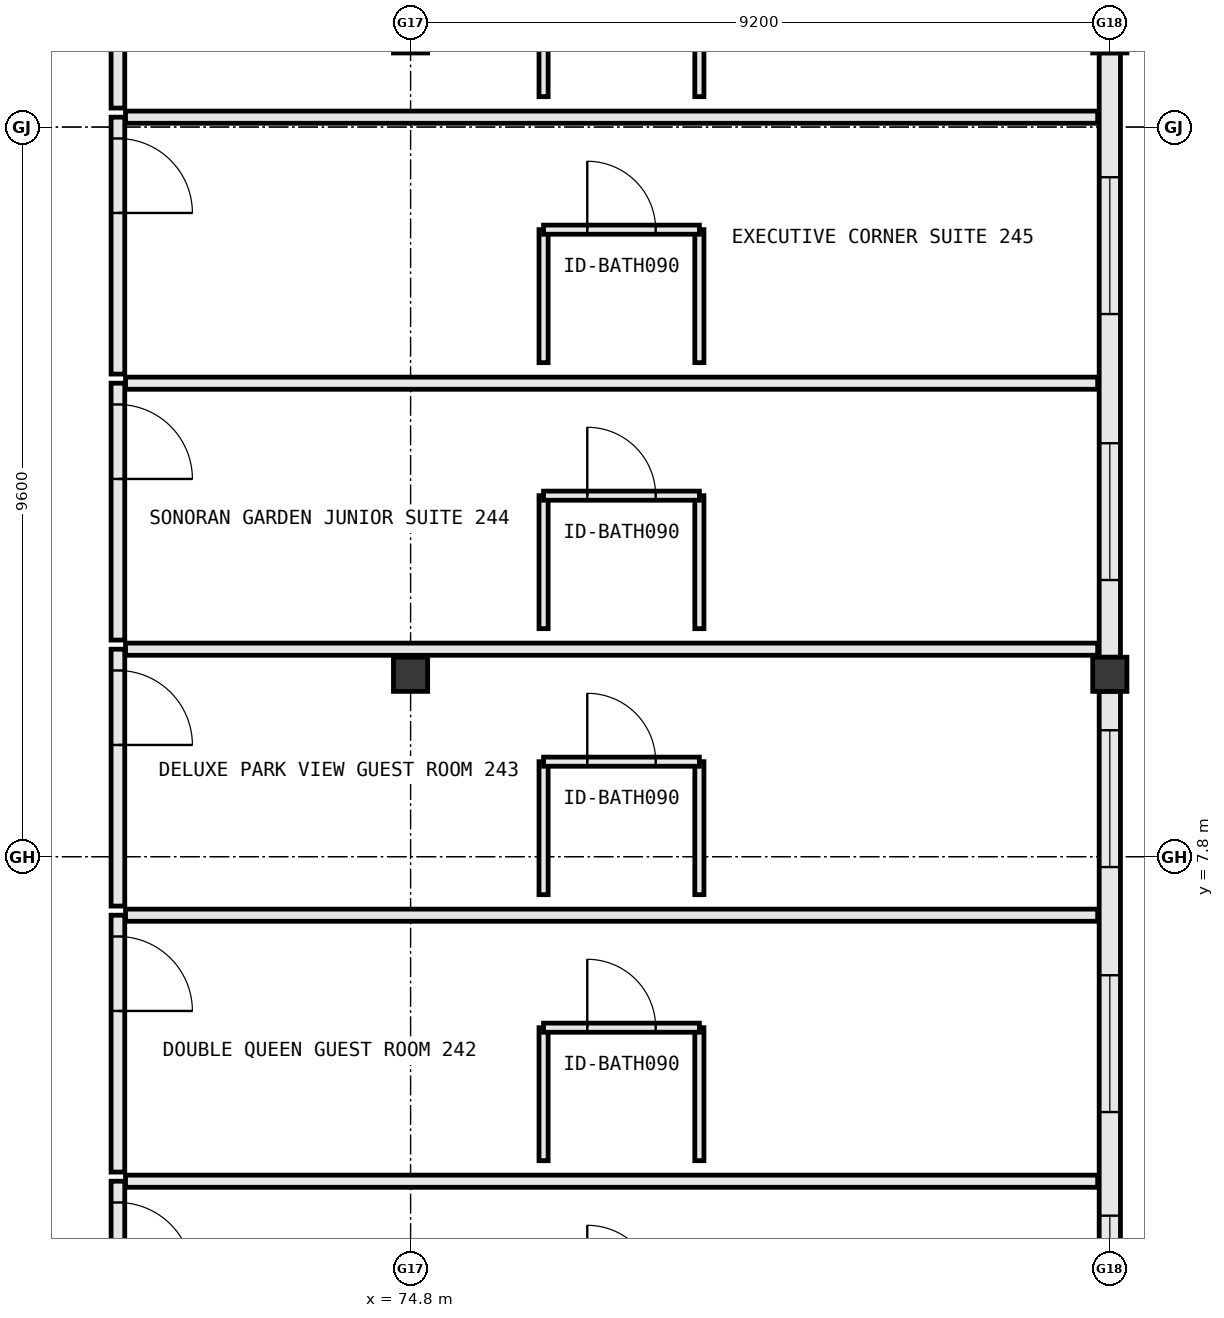
"""IFC4 building model, lengths in metres.
Left out: names, types, materials, properties, quantities, classifications, styles, units other than length and angle.
Written with IfcOpenShell. Run it as: python <this file> out.ifc"""

import sys

from ifc_helpers import new_model, si_unit, direction, frame, frame_2d, origin, origin_2d, place, context, subcontext, project, spatial, rectangle, extrude, element, fill, save


model = new_model("IFC4")
c1 = context("Model", 3, precision=1e-05, world=origin(), true_north=direction((0.0, 1.0)))
c2 = subcontext(c1, "Body", "Model", "MODEL_VIEW")
j1 = project(units=[si_unit("LENGTHUNIT", "METRE"), si_unit("PLANEANGLEUNIT", "RADIAN")], contexts=[c1])
p1 = place(None, origin())
s1 = spatial("IfcSite", under=j1, at=p1, CompositionType="ELEMENT")
p2 = place(p1, origin())
s2 = spatial("IfcBuilding", under=s1, at=p2, CompositionType="ELEMENT")
p3 = place(p2, frame((0.0, 0.0, 35.2)))
s3 = spatial("IfcBuildingStorey", under=s2, at=p3, CompositionType="ELEMENT", Elevation=35.2)
for number, where, z_axis, x_axis in (
    (1, (74.8, 10.2, 0.0), (0.0, 0.0, 1.0), (1.0, 0.0, 0.0)),
    (2, (74.8, 18.6, 0.0), (0.0, 0.0, 1.0), (1.0, 0.0, 0.0)),
    (3, (84.0, 10.2, 0.0), (0.0, 0.0, 1.0), (1.0, 0.0, 0.0)),
    (4, (84.0, 18.6, 0.0), (0.0, 0.0, 1.0), (1.0, 0.0, 0.0)),
):
    element("IfcColumn", number, at=place(p3, frame(where, z_axis=z_axis, x_axis=x_axis)), inside=s3, PredefinedType="COLUMN", context=c2, shape_type="SweptSolid", body=[
        extrude(rectangle(XDim=0.45, YDim=0.45, at=origin_2d()), origin(), (0.0, 0.0, 1.0), 3.8),
    ])
p4 = place(p3, frame((84.0, 0.823, 0.0), z_axis=(0.0, 0.0, 1.0), x_axis=(0.0, 1.0, 0.0)))
e5 = element("IfcWall", 5, at=p4, inside=s3, PredefinedType="STANDARD", context=c2, shape_type="SweptSolid", body=[
    extrude(rectangle(XDim=9.154, YDim=0.28, at=frame_2d((4.577, 0.0))), origin(), (0.0, 0.0, 1.0), 2.98),
])
p5 = place(p4, frame((0.454, 0.0, 0.85)))
e6 = element("IfcOpeningElement", 6, at=p5, cuts=e5, PredefinedType="OPENING", context=c2, shape_type="SweptSolid", body=[
    extrude(rectangle(XDim=1.8, YDim=1.85, at=frame_2d((0.9, 0.925))), frame((0.0, 0.152, 0.0), z_axis=(0.0, -1.0, 0.0), x_axis=(1.0, 0.0, 0.0)), (0.0, 0.0, 1.0), 0.304),
])
p6 = place(p4, frame((3.617, 0.0, 0.85)))
e7 = element("IfcOpeningElement", 7, at=p6, cuts=e5, PredefinedType="OPENING", context=c2, shape_type="SweptSolid", body=[
    extrude(rectangle(XDim=1.8, YDim=1.85, at=frame_2d((0.9, 0.925))), frame((0.0, 0.152, 0.0), z_axis=(0.0, -1.0, 0.0), x_axis=(1.0, 0.0, 0.0)), (0.0, 0.0, 1.0), 0.304),
])
p7 = place(p4, frame((6.841, 0.0, 0.85)))
e8 = element("IfcOpeningElement", 8, at=p7, cuts=e5, PredefinedType="OPENING", context=c2, shape_type="SweptSolid", body=[
    extrude(rectangle(XDim=1.8, YDim=1.85, at=frame_2d((0.9, 0.925))), frame((0.0, 0.152, 0.0), z_axis=(0.0, -1.0, 0.0), x_axis=(1.0, 0.0, 0.0)), (0.0, 0.0, 1.0), 0.304),
])
p8 = place(p3, frame((84.0, 10.423, 0.0), z_axis=(0.0, 0.0, 1.0), x_axis=(0.0, 1.0, 0.0)))
e9 = element("IfcWall", 9, at=p8, inside=s3, PredefinedType="STANDARD", context=c2, shape_type="SweptSolid", body=[
    extrude(rectangle(XDim=7.954, YDim=0.28, at=frame_2d((3.977, 0.0))), origin(), (0.0, 0.0, 1.0), 2.98),
])
p9 = place(p8, frame((1.017, 0.0, 0.85)))
e10 = element("IfcOpeningElement", 10, at=p9, cuts=e9, PredefinedType="OPENING", context=c2, shape_type="SweptSolid", body=[
    extrude(rectangle(XDim=1.8, YDim=1.85, at=frame_2d((0.9, 0.925))), frame((0.0, 0.152, 0.0), z_axis=(0.0, -1.0, 0.0), x_axis=(1.0, 0.0, 0.0)), (0.0, 0.0, 1.0), 0.304),
])
p10 = place(p8, frame((4.517, 0.0, 0.85)))
e11 = element("IfcOpeningElement", 11, at=p10, cuts=e9, PredefinedType="OPENING", context=c2, shape_type="SweptSolid", body=[
    extrude(rectangle(XDim=1.8, YDim=1.85, at=frame_2d((0.9, 0.925))), frame((0.0, 0.152, 0.0), z_axis=(0.0, -1.0, 0.0), x_axis=(1.0, 0.0, 0.0)), (0.0, 0.0, 1.0), 0.304),
])
p11 = place(p3, frame((70.95, 3.53, 0.0), z_axis=(0.0, 0.0, 1.0), x_axis=(0.0, -1.0, 0.0)))
e12 = element("IfcWall", 12, at=p11, inside=s3, PredefinedType="PARTITIONING", context=c2, shape_type="SweptSolid", body=[
    extrude(rectangle(XDim=3.38, YDim=0.18, at=frame_2d((1.69, 0.0))), origin(), (0.0, 0.0, 1.0), 3.565),
])
p12 = place(p11, frame((0.28, 0.0, 0.0)))
e13 = element("IfcOpeningElement", 13, at=p12, cuts=e12, PredefinedType="OPENING", context=c2, shape_type="SweptSolid", body=[
    extrude(rectangle(XDim=0.98, YDim=2.18, at=frame_2d((0.49, 1.09))), frame((0.0, 0.102, 0.0), z_axis=(0.0, -1.0, 0.0), x_axis=(1.0, 0.0, 0.0)), (0.0, 0.0, 1.0), 0.204),
])
p13 = place(p3, frame((71.05, 3.53, 0.0), z_axis=(0.0, 0.0, 1.0), x_axis=(1.0, 0.0, 0.0)))
e14 = element("IfcWall", 14, at=p13, inside=s3, PredefinedType="PARTITIONING", context=c2, shape_type="SweptSolid", body=[
    extrude(rectangle(XDim=12.79, YDim=0.16, at=frame_2d((6.395, 0.0))), origin(), (0.0, 0.0, 1.0), 3.565),
])
p14 = place(p3, frame((70.95, 7.03, 0.0), z_axis=(0.0, 0.0, 1.0), x_axis=(0.0, -1.0, 0.0)))
e15 = element("IfcWall", 15, at=p14, inside=s3, PredefinedType="PARTITIONING", context=c2, shape_type="SweptSolid", body=[
    extrude(rectangle(XDim=3.38, YDim=0.18, at=frame_2d((1.69, 0.0))), origin(), (0.0, 0.0, 1.0), 3.565),
])
p15 = place(p14, frame((0.28, 0.0, 0.0)))
e16 = element("IfcOpeningElement", 16, at=p15, cuts=e15, PredefinedType="OPENING", context=c2, shape_type="SweptSolid", body=[
    extrude(rectangle(XDim=0.98, YDim=2.18, at=frame_2d((0.49, 1.09))), frame((0.0, 0.102, 0.0), z_axis=(0.0, -1.0, 0.0), x_axis=(1.0, 0.0, 0.0)), (0.0, 0.0, 1.0), 0.204),
])
p16 = place(p3, frame((71.05, 7.03, 0.0), z_axis=(0.0, 0.0, 1.0), x_axis=(1.0, 0.0, 0.0)))
e17 = element("IfcWall", 17, at=p16, inside=s3, PredefinedType="PARTITIONING", context=c2, shape_type="SweptSolid", body=[
    extrude(rectangle(XDim=12.79, YDim=0.16, at=frame_2d((6.395, 0.0))), origin(), (0.0, 0.0, 1.0), 3.565),
])
for number, where, z_axis, x_axis in (
    (18, (76.55, 3.8, 0.0), (0.0, 0.0, 1.0), (0.0, 1.0, 0.0)),
    (19, (78.6, 3.8, 0.0), (0.0, 0.0, 1.0), (0.0, 1.0, 0.0)),
):
    element("IfcWall", number, at=place(p3, frame(where, z_axis=z_axis, x_axis=x_axis)), inside=s3, PredefinedType="PARTITIONING", context=c2, shape_type="SweptSolid", body=[
        extrude(rectangle(XDim=1.75, YDim=0.12, at=frame_2d((0.875, 0.0))), origin(), (0.0, 0.0, 1.0), 3.565),
    ])
p17 = place(p3, frame((76.55, 5.55, 0.0), z_axis=(0.0, 0.0, 1.0), x_axis=(1.0, 0.0, 0.0)))
e20 = element("IfcWall", 20, at=p17, inside=s3, PredefinedType="PARTITIONING", context=c2, shape_type="SweptSolid", body=[
    extrude(rectangle(XDim=2.05, YDim=0.12, at=frame_2d((1.025, 0.0))), origin(), (0.0, 0.0, 1.0), 3.565),
])
p18 = place(p17, frame((0.575, 0.0, 0.0)))
e21 = element("IfcOpeningElement", 21, at=p18, cuts=e20, PredefinedType="OPENING", context=c2, shape_type="SweptSolid", body=[
    extrude(rectangle(XDim=0.9, YDim=2.15, at=frame_2d((0.45, 1.075))), frame((0.0, 0.072, 0.0), z_axis=(0.0, -1.0, 0.0), x_axis=(1.0, 0.0, 0.0)), (0.0, 0.0, 1.0), 0.144),
])
p19 = place(p3, frame((70.95, 10.53, 0.0), z_axis=(0.0, 0.0, 1.0), x_axis=(0.0, -1.0, 0.0)))
e22 = element("IfcWall", 22, at=p19, inside=s3, PredefinedType="PARTITIONING", context=c2, shape_type="SweptSolid", body=[
    extrude(rectangle(XDim=3.38, YDim=0.18, at=frame_2d((1.69, 0.0))), origin(), (0.0, 0.0, 1.0), 3.565),
])
p20 = place(p19, frame((0.28, 0.0, 0.0)))
e23 = element("IfcOpeningElement", 23, at=p20, cuts=e22, PredefinedType="OPENING", context=c2, shape_type="SweptSolid", body=[
    extrude(rectangle(XDim=0.98, YDim=2.18, at=frame_2d((0.49, 1.09))), frame((0.0, 0.102, 0.0), z_axis=(0.0, -1.0, 0.0), x_axis=(1.0, 0.0, 0.0)), (0.0, 0.0, 1.0), 0.204),
])
p21 = place(p3, frame((71.05, 10.53, 0.0), z_axis=(0.0, 0.0, 1.0), x_axis=(1.0, 0.0, 0.0)))
e24 = element("IfcWall", 24, at=p21, inside=s3, PredefinedType="PARTITIONING", context=c2, shape_type="SweptSolid", body=[
    extrude(rectangle(XDim=12.79, YDim=0.16, at=frame_2d((6.395, 0.0))), origin(), (0.0, 0.0, 1.0), 2.94),
])
for number, where, z_axis, x_axis in (
    (25, (76.55, 7.3, 0.0), (0.0, 0.0, 1.0), (0.0, 1.0, 0.0)),
    (26, (78.6, 7.3, 0.0), (0.0, 0.0, 1.0), (0.0, 1.0, 0.0)),
):
    element("IfcWall", number, at=place(p3, frame(where, z_axis=z_axis, x_axis=x_axis)), inside=s3, PredefinedType="PARTITIONING", context=c2, shape_type="SweptSolid", body=[
        extrude(rectangle(XDim=1.75, YDim=0.12, at=frame_2d((0.875, 0.0))), origin(), (0.0, 0.0, 1.0), 3.565),
    ])
p22 = place(p3, frame((76.55, 9.05, 0.0), z_axis=(0.0, 0.0, 1.0), x_axis=(1.0, 0.0, 0.0)))
e27 = element("IfcWall", 27, at=p22, inside=s3, PredefinedType="PARTITIONING", context=c2, shape_type="SweptSolid", body=[
    extrude(rectangle(XDim=2.05, YDim=0.12, at=frame_2d((1.025, 0.0))), origin(), (0.0, 0.0, 1.0), 3.565),
])
p23 = place(p22, frame((0.575, 0.0, 0.0)))
e28 = element("IfcOpeningElement", 28, at=p23, cuts=e27, PredefinedType="OPENING", context=c2, shape_type="SweptSolid", body=[
    extrude(rectangle(XDim=0.9, YDim=2.15, at=frame_2d((0.45, 1.075))), frame((0.0, 0.072, 0.0), z_axis=(0.0, -1.0, 0.0), x_axis=(1.0, 0.0, 0.0)), (0.0, 0.0, 1.0), 0.144),
])
p24 = place(p3, frame((70.95, 14.03, 0.0), z_axis=(0.0, 0.0, 1.0), x_axis=(0.0, -1.0, 0.0)))
e29 = element("IfcWall", 29, at=p24, inside=s3, PredefinedType="PARTITIONING", context=c2, shape_type="SweptSolid", body=[
    extrude(rectangle(XDim=3.38, YDim=0.18, at=frame_2d((1.69, 0.0))), origin(), (0.0, 0.0, 1.0), 3.565),
])
p25 = place(p24, frame((0.28, 0.0, 0.0)))
e30 = element("IfcOpeningElement", 30, at=p25, cuts=e29, PredefinedType="OPENING", context=c2, shape_type="SweptSolid", body=[
    extrude(rectangle(XDim=0.98, YDim=2.18, at=frame_2d((0.49, 1.09))), frame((0.0, 0.102, 0.0), z_axis=(0.0, -1.0, 0.0), x_axis=(1.0, 0.0, 0.0)), (0.0, 0.0, 1.0), 0.204),
])
p26 = place(p3, frame((71.05, 14.03, 0.0), z_axis=(0.0, 0.0, 1.0), x_axis=(1.0, 0.0, 0.0)))
e31 = element("IfcWall", 31, at=p26, inside=s3, PredefinedType="PARTITIONING", context=c2, shape_type="SweptSolid", body=[
    extrude(rectangle(XDim=12.79, YDim=0.16, at=frame_2d((6.395, 0.0))), origin(), (0.0, 0.0, 1.0), 3.565),
])
for number, where, z_axis, x_axis in (
    (32, (76.55, 10.8, 0.0), (0.0, 0.0, 1.0), (0.0, 1.0, 0.0)),
    (33, (78.6, 10.8, 0.0), (0.0, 0.0, 1.0), (0.0, 1.0, 0.0)),
):
    element("IfcWall", number, at=place(p3, frame(where, z_axis=z_axis, x_axis=x_axis)), inside=s3, PredefinedType="PARTITIONING", context=c2, shape_type="SweptSolid", body=[
        extrude(rectangle(XDim=1.75, YDim=0.12, at=frame_2d((0.875, 0.0))), origin(), (0.0, 0.0, 1.0), 3.565),
    ])
p27 = place(p3, frame((76.55, 12.55, 0.0), z_axis=(0.0, 0.0, 1.0), x_axis=(1.0, 0.0, 0.0)))
e34 = element("IfcWall", 34, at=p27, inside=s3, PredefinedType="PARTITIONING", context=c2, shape_type="SweptSolid", body=[
    extrude(rectangle(XDim=2.05, YDim=0.12, at=frame_2d((1.025, 0.0))), origin(), (0.0, 0.0, 1.0), 3.565),
])
p28 = place(p27, frame((0.575, 0.0, 0.0)))
e35 = element("IfcOpeningElement", 35, at=p28, cuts=e34, PredefinedType="OPENING", context=c2, shape_type="SweptSolid", body=[
    extrude(rectangle(XDim=0.9, YDim=2.15, at=frame_2d((0.45, 1.075))), frame((0.0, 0.072, 0.0), z_axis=(0.0, -1.0, 0.0), x_axis=(1.0, 0.0, 0.0)), (0.0, 0.0, 1.0), 0.144),
])
p29 = place(p3, frame((70.95, 17.53, 0.0), z_axis=(0.0, 0.0, 1.0), x_axis=(0.0, -1.0, 0.0)))
e36 = element("IfcWall", 36, at=p29, inside=s3, PredefinedType="PARTITIONING", context=c2, shape_type="SweptSolid", body=[
    extrude(rectangle(XDim=3.38, YDim=0.18, at=frame_2d((1.69, 0.0))), origin(), (0.0, 0.0, 1.0), 3.565),
])
p30 = place(p29, frame((0.28, 0.0, 0.0)))
e37 = element("IfcOpeningElement", 37, at=p30, cuts=e36, PredefinedType="OPENING", context=c2, shape_type="SweptSolid", body=[
    extrude(rectangle(XDim=0.98, YDim=2.18, at=frame_2d((0.49, 1.09))), frame((0.0, 0.102, 0.0), z_axis=(0.0, -1.0, 0.0), x_axis=(1.0, 0.0, 0.0)), (0.0, 0.0, 1.0), 0.204),
])
p31 = place(p3, frame((71.05, 17.53, 0.0), z_axis=(0.0, 0.0, 1.0), x_axis=(1.0, 0.0, 0.0)))
e38 = element("IfcWall", 38, at=p31, inside=s3, PredefinedType="PARTITIONING", context=c2, shape_type="SweptSolid", body=[
    extrude(rectangle(XDim=12.79, YDim=0.16, at=frame_2d((6.395, 0.0))), origin(), (0.0, 0.0, 1.0), 3.565),
])
for number, where, z_axis, x_axis in (
    (39, (76.55, 14.3, 0.0), (0.0, 0.0, 1.0), (0.0, 1.0, 0.0)),
    (40, (78.6, 14.3, 0.0), (0.0, 0.0, 1.0), (0.0, 1.0, 0.0)),
):
    element("IfcWall", number, at=place(p3, frame(where, z_axis=z_axis, x_axis=x_axis)), inside=s3, PredefinedType="PARTITIONING", context=c2, shape_type="SweptSolid", body=[
        extrude(rectangle(XDim=1.75, YDim=0.12, at=frame_2d((0.875, 0.0))), origin(), (0.0, 0.0, 1.0), 3.565),
    ])
p32 = place(p3, frame((76.55, 16.05, 0.0), z_axis=(0.0, 0.0, 1.0), x_axis=(1.0, 0.0, 0.0)))
e41 = element("IfcWall", 41, at=p32, inside=s3, PredefinedType="PARTITIONING", context=c2, shape_type="SweptSolid", body=[
    extrude(rectangle(XDim=2.05, YDim=0.12, at=frame_2d((1.025, 0.0))), origin(), (0.0, 0.0, 1.0), 3.565),
])
p33 = place(p32, frame((0.575, 0.0, 0.0)))
e42 = element("IfcOpeningElement", 42, at=p33, cuts=e41, PredefinedType="OPENING", context=c2, shape_type="SweptSolid", body=[
    extrude(rectangle(XDim=0.9, YDim=2.15, at=frame_2d((0.45, 1.075))), frame((0.0, 0.072, 0.0), z_axis=(0.0, -1.0, 0.0), x_axis=(1.0, 0.0, 0.0)), (0.0, 0.0, 1.0), 0.144),
])
p34 = place(p3, frame((70.95, 21.03, 0.0), z_axis=(0.0, 0.0, 1.0), x_axis=(0.0, -1.0, 0.0)))
e43 = element("IfcWall", 43, at=p34, inside=s3, PredefinedType="PARTITIONING", context=c2, shape_type="SweptSolid", body=[
    extrude(rectangle(XDim=3.38, YDim=0.18, at=frame_2d((1.69, 0.0))), origin(), (0.0, 0.0, 1.0), 3.565),
])
p35 = place(p34, frame((0.28, 0.0, 0.0)))
e44 = element("IfcOpeningElement", 44, at=p35, cuts=e43, PredefinedType="OPENING", context=c2, shape_type="SweptSolid", body=[
    extrude(rectangle(XDim=0.98, YDim=2.18, at=frame_2d((0.49, 1.09))), frame((0.0, 0.102, 0.0), z_axis=(0.0, -1.0, 0.0), x_axis=(1.0, 0.0, 0.0)), (0.0, 0.0, 1.0), 0.204),
])
for number, where, z_axis, x_axis in (
    (45, (76.55, 17.8, 0.0), (0.0, 0.0, 1.0), (0.0, 1.0, 0.0)),
    (46, (78.6, 17.8, 0.0), (0.0, 0.0, 1.0), (0.0, 1.0, 0.0)),
):
    element("IfcWall", number, at=place(p3, frame(where, z_axis=z_axis, x_axis=x_axis)), inside=s3, PredefinedType="PARTITIONING", context=c2, shape_type="SweptSolid", body=[
        extrude(rectangle(XDim=1.75, YDim=0.12, at=frame_2d((0.875, 0.0))), origin(), (0.0, 0.0, 1.0), 3.565),
    ])
p36 = place(p5, origin())
e47 = element("IfcWindow", 47, at=p36, inside=s3, PartitioningType="SINGLE_PANEL", PredefinedType="WINDOW", context=c2, shape_type="SweptSolid", body=[
    extrude(rectangle(XDim=1.8, YDim=1.85, at=frame_2d((0.9, 0.925))), frame((0.0, 0.03, 0.0), z_axis=(0.0, -1.0, 0.0), x_axis=(1.0, 0.0, 0.0)), (0.0, 0.0, 1.0), 0.06),
])
fill(e6, e47)
p37 = place(p6, origin())
e48 = element("IfcWindow", 48, at=p37, inside=s3, PartitioningType="SINGLE_PANEL", PredefinedType="WINDOW", context=c2, shape_type="SweptSolid", body=[
    extrude(rectangle(XDim=1.8, YDim=1.85, at=frame_2d((0.9, 0.925))), frame((0.0, 0.03, 0.0), z_axis=(0.0, -1.0, 0.0), x_axis=(1.0, 0.0, 0.0)), (0.0, 0.0, 1.0), 0.06),
])
fill(e7, e48)
p38 = place(p7, origin())
e49 = element("IfcWindow", 49, at=p38, inside=s3, PartitioningType="SINGLE_PANEL", PredefinedType="WINDOW", context=c2, shape_type="SweptSolid", body=[
    extrude(rectangle(XDim=1.8, YDim=1.85, at=frame_2d((0.9, 0.925))), frame((0.0, 0.03, 0.0), z_axis=(0.0, -1.0, 0.0), x_axis=(1.0, 0.0, 0.0)), (0.0, 0.0, 1.0), 0.06),
])
fill(e8, e49)
p39 = place(p9, origin())
e50 = element("IfcWindow", 50, at=p39, inside=s3, PartitioningType="SINGLE_PANEL", PredefinedType="WINDOW", context=c2, shape_type="SweptSolid", body=[
    extrude(rectangle(XDim=1.8, YDim=1.85, at=frame_2d((0.9, 0.925))), frame((0.0, 0.03, 0.0), z_axis=(0.0, -1.0, 0.0), x_axis=(1.0, 0.0, 0.0)), (0.0, 0.0, 1.0), 0.06),
])
fill(e10, e50)
p40 = place(p10, origin())
e51 = element("IfcWindow", 51, at=p40, inside=s3, PartitioningType="SINGLE_PANEL", PredefinedType="WINDOW", context=c2, shape_type="SweptSolid", body=[
    extrude(rectangle(XDim=1.8, YDim=1.85, at=frame_2d((0.9, 0.925))), frame((0.0, 0.03, 0.0), z_axis=(0.0, -1.0, 0.0), x_axis=(1.0, 0.0, 0.0)), (0.0, 0.0, 1.0), 0.06),
])
fill(e11, e51)
p41 = place(p12, origin())
e52 = element("IfcDoor", 52, at=p41, inside=s3, OperationType="SINGLE_SWING_RIGHT", PredefinedType="DOOR", context=c2, shape_type="SweptSolid", body=[
    extrude(rectangle(XDim=0.98, YDim=2.18, at=frame_2d((0.49, 1.09))), frame((0.0, 0.025, 0.0), z_axis=(0.0, -1.0, 0.0), x_axis=(1.0, 0.0, 0.0)), (0.0, 0.0, 1.0), 0.05),
])
fill(e13, e52)
p42 = place(p15, origin())
e53 = element("IfcDoor", 53, at=p42, inside=s3, OperationType="SINGLE_SWING_RIGHT", PredefinedType="DOOR", context=c2, shape_type="SweptSolid", body=[
    extrude(rectangle(XDim=0.98, YDim=2.18, at=frame_2d((0.49, 1.09))), frame((0.0, 0.025, 0.0), z_axis=(0.0, -1.0, 0.0), x_axis=(1.0, 0.0, 0.0)), (0.0, 0.0, 1.0), 0.05),
])
fill(e16, e53)
p43 = place(p18, origin())
e54 = element("IfcDoor", 54, at=p43, inside=s3, OperationType="SINGLE_SWING_LEFT", PredefinedType="DOOR", context=c2, shape_type="SweptSolid", body=[
    extrude(rectangle(XDim=0.9, YDim=2.15, at=frame_2d((0.45, 1.075))), frame((0.0, 0.025, 0.0), z_axis=(0.0, -1.0, 0.0), x_axis=(1.0, 0.0, 0.0)), (0.0, 0.0, 1.0), 0.05),
])
fill(e21, e54)
p44 = place(p20, origin())
e55 = element("IfcDoor", 55, at=p44, inside=s3, OperationType="SINGLE_SWING_RIGHT", PredefinedType="DOOR", context=c2, shape_type="SweptSolid", body=[
    extrude(rectangle(XDim=0.98, YDim=2.18, at=frame_2d((0.49, 1.09))), frame((0.0, 0.025, 0.0), z_axis=(0.0, -1.0, 0.0), x_axis=(1.0, 0.0, 0.0)), (0.0, 0.0, 1.0), 0.05),
])
fill(e23, e55)
p45 = place(p23, origin())
e56 = element("IfcDoor", 56, at=p45, inside=s3, OperationType="SINGLE_SWING_LEFT", PredefinedType="DOOR", context=c2, shape_type="SweptSolid", body=[
    extrude(rectangle(XDim=0.9, YDim=2.15, at=frame_2d((0.45, 1.075))), frame((0.0, 0.025, 0.0), z_axis=(0.0, -1.0, 0.0), x_axis=(1.0, 0.0, 0.0)), (0.0, 0.0, 1.0), 0.05),
])
fill(e28, e56)
p46 = place(p25, origin())
e57 = element("IfcDoor", 57, at=p46, inside=s3, OperationType="SINGLE_SWING_RIGHT", PredefinedType="DOOR", context=c2, shape_type="SweptSolid", body=[
    extrude(rectangle(XDim=0.98, YDim=2.18, at=frame_2d((0.49, 1.09))), frame((0.0, 0.025, 0.0), z_axis=(0.0, -1.0, 0.0), x_axis=(1.0, 0.0, 0.0)), (0.0, 0.0, 1.0), 0.05),
])
fill(e30, e57)
p47 = place(p28, origin())
e58 = element("IfcDoor", 58, at=p47, inside=s3, OperationType="SINGLE_SWING_LEFT", PredefinedType="DOOR", context=c2, shape_type="SweptSolid", body=[
    extrude(rectangle(XDim=0.9, YDim=2.15, at=frame_2d((0.45, 1.075))), frame((0.0, 0.025, 0.0), z_axis=(0.0, -1.0, 0.0), x_axis=(1.0, 0.0, 0.0)), (0.0, 0.0, 1.0), 0.05),
])
fill(e35, e58)
p48 = place(p30, origin())
e59 = element("IfcDoor", 59, at=p48, inside=s3, OperationType="SINGLE_SWING_RIGHT", PredefinedType="DOOR", context=c2, shape_type="SweptSolid", body=[
    extrude(rectangle(XDim=0.98, YDim=2.18, at=frame_2d((0.49, 1.09))), frame((0.0, 0.025, 0.0), z_axis=(0.0, -1.0, 0.0), x_axis=(1.0, 0.0, 0.0)), (0.0, 0.0, 1.0), 0.05),
])
fill(e37, e59)
p49 = place(p33, origin())
e60 = element("IfcDoor", 60, at=p49, inside=s3, OperationType="SINGLE_SWING_LEFT", PredefinedType="DOOR", context=c2, shape_type="SweptSolid", body=[
    extrude(rectangle(XDim=0.9, YDim=2.15, at=frame_2d((0.45, 1.075))), frame((0.0, 0.025, 0.0), z_axis=(0.0, -1.0, 0.0), x_axis=(1.0, 0.0, 0.0)), (0.0, 0.0, 1.0), 0.05),
])
fill(e42, e60)
save(model, sys.argv[1])
